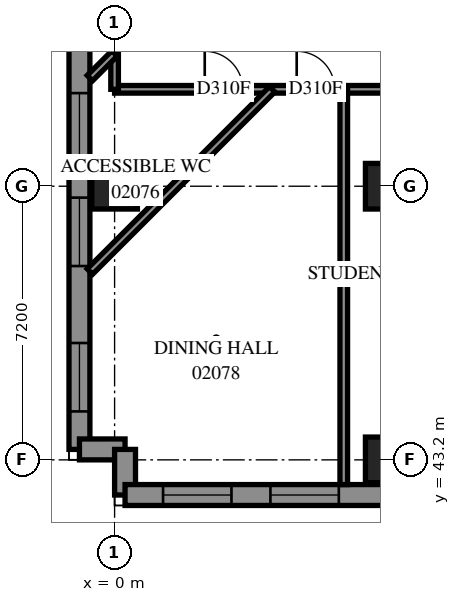
"""IFC4 building model, lengths in metres.
Left out: names, types, materials, properties, quantities, classifications, styles, units other than length and angle.
Written with IfcOpenShell. Run it as: python <this file> out.ifc"""

import sys

from ifc_helpers import new_model, si_unit, direction, frame, frame_2d, origin, origin_2d, place, context, subcontext, project, spatial, polyline, rectangle, outline, extrude, element, fill, save


model = new_model("IFC4")
c1 = context("Model", 3, precision=1e-05, world=origin(), true_north=direction((0.0, 1.0)))
c2 = subcontext(c1, "Body", "Model", "MODEL_VIEW")
j1 = project(units=[si_unit("LENGTHUNIT", "METRE"), si_unit("PLANEANGLEUNIT", "RADIAN")], contexts=[c1])
p1 = place(None, origin())
s1 = spatial("IfcSite", under=j1, at=p1, CompositionType="ELEMENT")
p2 = place(p1, origin())
s2 = spatial("IfcBuilding", under=s1, at=p2, CompositionType="ELEMENT")
p3 = place(p2, frame((0.0, 0.0, 10.2)))
s3 = spatial("IfcBuildingStorey", under=s2, at=p3, CompositionType="ELEMENT", Elevation=10.2)
for number, where, z_axis, x_axis in (
    (1, (0.0, 50.4, 0.0), (0.0, 0.0, 1.0), (1.0, 0.0, 0.0)),
    (2, (7.2, 43.2, 0.0), (0.0, 0.0, 1.0), (1.0, 0.0, 0.0)),
    (3, (7.2, 50.4, 0.0), (0.0, 0.0, 1.0), (1.0, 0.0, 0.0)),
):
    element("IfcColumn", number, at=place(p3, frame(where, z_axis=z_axis, x_axis=x_axis)), inside=s3, PredefinedType="COLUMN", context=c2, shape_type="SweptSolid", body=[
        extrude(rectangle(XDim=1.2, YDim=1.2, at=origin_2d()), origin(), (0.0, 0.0, 1.0), 3.8),
    ])
p4 = place(p3, frame((-0.925, 71.725, 0.0), z_axis=(0.0, 0.0, 1.0), x_axis=(0.0, -1.0, 0.0)))
e4 = element("IfcWall", 4, at=p4, inside=s3, PredefinedType="SOLIDWALL", context=c2, shape_type="SweptSolid", body=[
    extrude(outline(polyline([(-0.275, -0.275), (28.525, -0.275), (27.975, 0.275), (0.275, 0.275), (-0.275, -0.275)])), origin(), (0.0, 0.0, 1.0), 3.8),
])
p5 = place(p4, frame((1.0, 0.0, 0.7)))
e5 = element("IfcOpeningElement", 5, at=p5, cuts=e4, PredefinedType="OPENING", context=c2, shape_type="SweptSolid", body=[
    extrude(rectangle(XDim=1.8, YDim=2.6, at=frame_2d((0.9, 1.3))), frame((0.0, 0.285, 0.0), z_axis=(0.0, -1.0, 0.0), x_axis=(1.0, 0.0, 0.0)), (0.0, 0.0, 1.0), 0.57),
])
p6 = place(p4, frame((4.225, 0.0, 0.7)))
e6 = element("IfcOpeningElement", 6, at=p6, cuts=e4, PredefinedType="OPENING", context=c2, shape_type="SweptSolid", body=[
    extrude(rectangle(XDim=1.8, YDim=2.6, at=frame_2d((0.9, 1.3))), frame((0.0, 0.285, 0.0), z_axis=(0.0, -1.0, 0.0), x_axis=(1.0, 0.0, 0.0)), (0.0, 0.0, 1.0), 0.57),
])
p7 = place(p4, frame((7.525, 0.0, 0.7)))
e7 = element("IfcOpeningElement", 7, at=p7, cuts=e4, PredefinedType="OPENING", context=c2, shape_type="SweptSolid", body=[
    extrude(rectangle(XDim=1.8, YDim=2.6, at=frame_2d((0.9, 1.3))), frame((0.0, 0.285, 0.0), z_axis=(0.0, -1.0, 0.0), x_axis=(1.0, 0.0, 0.0)), (0.0, 0.0, 1.0), 0.57),
])
p8 = place(p4, frame((14.725, 0.0, 0.7)))
e8 = element("IfcOpeningElement", 8, at=p8, cuts=e4, PredefinedType="OPENING", context=c2, shape_type="SweptSolid", body=[
    extrude(rectangle(XDim=1.8, YDim=2.6, at=frame_2d((0.9, 1.3))), frame((0.0, 0.285, 0.0), z_axis=(0.0, -1.0, 0.0), x_axis=(1.0, 0.0, 0.0)), (0.0, 0.0, 1.0), 0.57),
])
p9 = place(p4, frame((18.875, 0.0, 0.7)))
e9 = element("IfcOpeningElement", 9, at=p9, cuts=e4, PredefinedType="OPENING", context=c2, shape_type="SweptSolid", body=[
    extrude(rectangle(XDim=1.8, YDim=2.6, at=frame_2d((0.9, 1.3))), frame((0.0, 0.285, 0.0), z_axis=(0.0, -1.0, 0.0), x_axis=(1.0, 0.0, 0.0)), (0.0, 0.0, 1.0), 0.57),
])
p10 = place(p4, frame((21.625, 0.0, 0.7)))
e10 = element("IfcOpeningElement", 10, at=p10, cuts=e4, PredefinedType="OPENING", context=c2, shape_type="SweptSolid", body=[
    extrude(rectangle(XDim=1.8, YDim=2.6, at=frame_2d((0.9, 1.3))), frame((0.0, 0.285, 0.0), z_axis=(0.0, -1.0, 0.0), x_axis=(1.0, 0.0, 0.0)), (0.0, 0.0, 1.0), 0.57),
])
p11 = place(p4, frame((25.45, 0.0, 0.7)))
e11 = element("IfcOpeningElement", 11, at=p11, cuts=e4, PredefinedType="OPENING", context=c2, shape_type="SweptSolid", body=[
    extrude(rectangle(XDim=1.8, YDim=2.6, at=frame_2d((0.9, 1.3))), frame((0.0, 0.285, 0.0), z_axis=(0.0, -1.0, 0.0), x_axis=(1.0, 0.0, 0.0)), (0.0, 0.0, 1.0), 0.57),
])
p12 = place(p4, frame((11.8, 0.0, 0.45)))
e12 = element("IfcOpeningElement", 12, at=p12, cuts=e4, PredefinedType="OPENING", context=c2, shape_type="SweptSolid", body=[
    extrude(rectangle(XDim=1.3, YDim=2.5, at=frame_2d((0.65, 1.25))), frame((0.0, 0.285, 0.0), z_axis=(0.0, -1.0, 0.0), x_axis=(1.0, 0.0, 0.0)), (0.0, 0.0, 1.0), 0.57),
])
p13 = place(p3, frame((-0.925, 43.475, 0.0), z_axis=(0.0, 0.0, 1.0), x_axis=(1.0, 0.0, 0.0)))
e13 = element("IfcWall", 13, at=p13, inside=s3, PredefinedType="SOLIDWALL", context=c2, shape_type="SweptSolid", body=[
    extrude(outline(polyline([(-0.275, -0.275), (0.925, -0.275), (1.475, 0.275), (0.275, 0.275), (-0.275, -0.275)])), origin(), (0.0, 0.0, 1.0), 3.8),
])
p14 = place(p3, frame((0.275, 43.475, 0.0), z_axis=(0.0, 0.0, 1.0), x_axis=(0.0, -1.0, 0.0)))
e14 = element("IfcWall", 14, at=p14, inside=s3, PredefinedType="SOLIDWALL", context=c2, shape_type="SweptSolid", body=[
    extrude(outline(polyline([(0.275, -0.275), (1.475, -0.275), (0.925, 0.275), (-0.275, 0.275), (0.275, -0.275)])), origin(), (0.0, 0.0, 1.0), 3.8),
])
p15 = place(p3, frame((0.275, 42.275, 0.0), z_axis=(0.0, 0.0, 1.0), x_axis=(1.0, 0.0, 0.0)))
e15 = element("IfcWall", 15, at=p15, inside=s3, PredefinedType="SOLIDWALL", context=c2, shape_type="SweptSolid", body=[
    extrude(outline(polyline([(-0.275, -0.275), (12.925, -0.275), (13.475, 0.275), (0.275, 0.275), (-0.275, -0.275)])), origin(), (0.0, 0.0, 1.0), 3.8),
])
p16 = place(p15, frame((1.0, 0.0, 0.7)))
e16 = element("IfcOpeningElement", 16, at=p16, cuts=e15, PredefinedType="OPENING", context=c2, shape_type="SweptSolid", body=[
    extrude(rectangle(XDim=1.8, YDim=2.6, at=frame_2d((0.9, 1.3))), frame((0.0, 0.285, 0.0), z_axis=(0.0, -1.0, 0.0), x_axis=(1.0, 0.0, 0.0)), (0.0, 0.0, 1.0), 0.57),
])
p17 = place(p15, frame((3.825, 0.0, 0.7)))
e17 = element("IfcOpeningElement", 17, at=p17, cuts=e15, PredefinedType="OPENING", context=c2, shape_type="SweptSolid", body=[
    extrude(rectangle(XDim=1.8, YDim=2.6, at=frame_2d((0.9, 1.3))), frame((0.0, 0.285, 0.0), z_axis=(0.0, -1.0, 0.0), x_axis=(1.0, 0.0, 0.0)), (0.0, 0.0, 1.0), 0.57),
])
p18 = place(p15, frame((7.825, 0.0, 0.7)))
e18 = element("IfcOpeningElement", 18, at=p18, cuts=e15, PredefinedType="OPENING", context=c2, shape_type="SweptSolid", body=[
    extrude(rectangle(XDim=1.8, YDim=2.6, at=frame_2d((0.9, 1.3))), frame((0.0, 0.285, 0.0), z_axis=(0.0, -1.0, 0.0), x_axis=(1.0, 0.0, 0.0)), (0.0, 0.0, 1.0), 0.57),
])
p19 = place(p15, frame((10.863, 0.0, 0.7)))
e19 = element("IfcOpeningElement", 19, at=p19, cuts=e15, PredefinedType="OPENING", context=c2, shape_type="SweptSolid", body=[
    extrude(rectangle(XDim=1.8, YDim=2.6, at=frame_2d((0.9, 1.3))), frame((0.0, 0.285, 0.0), z_axis=(0.0, -1.0, 0.0), x_axis=(1.0, 0.0, 0.0)), (0.0, 0.0, 1.0), 0.57),
])
p20 = place(p3, frame((0.0, 52.95, 0.0), z_axis=(0.0, 0.0, 1.0), x_axis=(1.0, 0.0, 0.0)))
e20 = element("IfcWall", 20, at=p20, inside=s3, PredefinedType="PARTITIONING", context=c2, shape_type="SweptSolid", body=[
    extrude(rectangle(XDim=54.5, YDim=0.2, at=frame_2d((27.25, 0.0))), origin(), (0.0, 0.0, 1.0), 3.8),
])
p21 = place(p20, frame((8.669, 0.0, 0.0)))
e21 = element("IfcOpeningElement", 21, at=p21, cuts=e20, PredefinedType="OPENING", context=c2, shape_type="SweptSolid", body=[
    extrude(rectangle(XDim=1.0, YDim=2.1, at=frame_2d((0.5, 1.05))), frame((0.0, 0.11, 0.0), z_axis=(0.0, -1.0, 0.0), x_axis=(1.0, 0.0, 0.0)), (0.0, 0.0, 1.0), 0.22),
])
p22 = place(p20, frame((11.307, 0.0, 0.0)))
e22 = element("IfcOpeningElement", 22, at=p22, cuts=e20, PredefinedType="OPENING", context=c2, shape_type="SweptSolid", body=[
    extrude(rectangle(XDim=1.0, YDim=2.1, at=frame_2d((0.5, 1.05))), frame((0.0, 0.11, 0.0), z_axis=(0.0, -1.0, 0.0), x_axis=(1.0, 0.0, 0.0)), (0.0, 0.0, 1.0), 0.22),
])
p23 = place(p20, frame((16.433, 0.0, 0.0)))
e23 = element("IfcOpeningElement", 23, at=p23, cuts=e20, PredefinedType="OPENING", context=c2, shape_type="SweptSolid", body=[
    extrude(rectangle(XDim=1.0, YDim=2.1, at=frame_2d((0.5, 1.05))), frame((0.0, 0.11, 0.0), z_axis=(0.0, -1.0, 0.0), x_axis=(1.0, 0.0, 0.0)), (0.0, 0.0, 1.0), 0.22),
])
p24 = place(p20, frame((22.025, 0.0, 0.0)))
e24 = element("IfcOpeningElement", 24, at=p24, cuts=e20, PredefinedType="OPENING", context=c2, shape_type="SweptSolid", body=[
    extrude(rectangle(XDim=1.0, YDim=2.1, at=frame_2d((0.5, 1.05))), frame((0.0, 0.11, 0.0), z_axis=(0.0, -1.0, 0.0), x_axis=(1.0, 0.0, 0.0)), (0.0, 0.0, 1.0), 0.22),
])
p25 = place(p20, frame((30.565, 0.0, 0.0)))
e25 = element("IfcOpeningElement", 25, at=p25, cuts=e20, PredefinedType="OPENING", context=c2, shape_type="SweptSolid", body=[
    extrude(rectangle(XDim=1.0, YDim=2.1, at=frame_2d((0.5, 1.05))), frame((0.0, 0.11, 0.0), z_axis=(0.0, -1.0, 0.0), x_axis=(1.0, 0.0, 0.0)), (0.0, 0.0, 1.0), 0.22),
])
p26 = place(p20, frame((32.925, 0.0, 0.0)))
e26 = element("IfcOpeningElement", 26, at=p26, cuts=e20, PredefinedType="OPENING", context=c2, shape_type="SweptSolid", body=[
    extrude(rectangle(XDim=1.0, YDim=2.1, at=frame_2d((0.5, 1.05))), frame((0.0, 0.11, 0.0), z_axis=(0.0, -1.0, 0.0), x_axis=(1.0, 0.0, 0.0)), (0.0, 0.0, 1.0), 0.22),
])
p27 = place(p20, frame((37.765, 0.0, 0.0)))
e27 = element("IfcOpeningElement", 27, at=p27, cuts=e20, PredefinedType="OPENING", context=c2, shape_type="SweptSolid", body=[
    extrude(rectangle(XDim=1.0, YDim=2.1, at=frame_2d((0.5, 1.05))), frame((0.0, 0.11, 0.0), z_axis=(0.0, -1.0, 0.0), x_axis=(1.0, 0.0, 0.0)), (0.0, 0.0, 1.0), 0.22),
])
p28 = place(p20, frame((40.125, 0.0, 0.0)))
e28 = element("IfcOpeningElement", 28, at=p28, cuts=e20, PredefinedType="OPENING", context=c2, shape_type="SweptSolid", body=[
    extrude(rectangle(XDim=1.0, YDim=2.1, at=frame_2d((0.5, 1.05))), frame((0.0, 0.11, 0.0), z_axis=(0.0, -1.0, 0.0), x_axis=(1.0, 0.0, 0.0)), (0.0, 0.0, 1.0), 0.22),
])
p29 = place(p20, frame((44.965, 0.0, 0.0)))
e29 = element("IfcOpeningElement", 29, at=p29, cuts=e20, PredefinedType="OPENING", context=c2, shape_type="SweptSolid", body=[
    extrude(rectangle(XDim=1.0, YDim=2.1, at=frame_2d((0.5, 1.05))), frame((0.0, 0.11, 0.0), z_axis=(0.0, -1.0, 0.0), x_axis=(1.0, 0.0, 0.0)), (0.0, 0.0, 1.0), 0.22),
])
p30 = place(p20, frame((47.325, 0.0, 0.0)))
e30 = element("IfcOpeningElement", 30, at=p30, cuts=e20, PredefinedType="OPENING", context=c2, shape_type="SweptSolid", body=[
    extrude(rectangle(XDim=1.0, YDim=2.1, at=frame_2d((0.5, 1.05))), frame((0.0, 0.11, 0.0), z_axis=(0.0, -1.0, 0.0), x_axis=(1.0, 0.0, 0.0)), (0.0, 0.0, 1.0), 0.22),
])
p31 = place(p20, frame((52.165, 0.0, 0.0)))
e31 = element("IfcOpeningElement", 31, at=p31, cuts=e20, PredefinedType="OPENING", context=c2, shape_type="SweptSolid", body=[
    extrude(rectangle(XDim=1.0, YDim=2.1, at=frame_2d((0.5, 1.05))), frame((0.0, 0.11, 0.0), z_axis=(0.0, -1.0, 0.0), x_axis=(1.0, 0.0, 0.0)), (0.0, 0.0, 1.0), 0.22),
])
p32 = place(p20, frame((2.372, 0.0, 0.0)))
e32 = element("IfcOpeningElement", 32, at=p32, cuts=e20, PredefinedType="OPENING", context=c2, shape_type="SweptSolid", body=[
    extrude(rectangle(XDim=1.0, YDim=2.1, at=frame_2d((0.5, 1.05))), frame((0.0, 0.11, 0.0), z_axis=(0.0, -1.0, 0.0), x_axis=(1.0, 0.0, 0.0)), (0.0, 0.0, 1.0), 0.22),
])
p33 = place(p20, frame((4.792, 0.0, 0.0)))
e33 = element("IfcOpeningElement", 33, at=p33, cuts=e20, PredefinedType="OPENING", context=c2, shape_type="SweptSolid", body=[
    extrude(rectangle(XDim=1.0, YDim=2.1, at=frame_2d((0.5, 1.05))), frame((0.0, 0.11, 0.0), z_axis=(0.0, -1.0, 0.0), x_axis=(1.0, 0.0, 0.0)), (0.0, 0.0, 1.0), 0.22),
])
p34 = place(p3, frame((6.03, 42.55, 0.0), z_axis=(0.0, 0.0, 1.0), x_axis=(0.0, 1.0, 0.0)))
e34 = element("IfcWall", 34, at=p34, inside=s3, PredefinedType="PARTITIONING", context=c2, shape_type="SweptSolid", body=[
    extrude(rectangle(XDim=10.4, YDim=0.2, at=frame_2d((5.2, 0.0))), origin(), (0.0, 0.0, 1.0), 3.8),
])
p35 = place(p3, frame((-0.65, 48.154, 0.0), z_axis=(0.0, 0.0, 1.0), x_axis=(0.7070994105, 0.7071141518, 0.0)))
e35 = element("IfcWall", 35, at=p35, inside=s3, PredefinedType="PARTITIONING", context=c2, shape_type="SweptSolid", body=[
    extrude(rectangle(XDim=6.784, YDim=0.2, at=frame_2d((3.392, 0.0))), origin(), (0.0, 0.0, 1.0), 3.8),
])
p36 = place(p3, frame((0.0, 52.95, 0.0), z_axis=(0.0, 0.0, 1.0), x_axis=(0.0, 1.0, 0.0)))
e36 = element("IfcWall", 36, at=p36, inside=s3, PredefinedType="PARTITIONING", context=c2, shape_type="SweptSolid", body=[
    extrude(rectangle(XDim=2.1, YDim=0.2, at=frame_2d((1.05, 0.0))), origin(), (0.0, 0.0, 1.0), 3.2),
])
p37 = place(p3, frame((-0.65, 53.246, 0.0), z_axis=(0.0, 0.0, 1.0), x_axis=(0.7071612431, 0.707052315, 0.0)))
e37 = element("IfcWall", 37, at=p37, inside=s3, PredefinedType="PARTITIONING", context=c2, shape_type="SweptSolid", body=[
    extrude(rectangle(XDim=0.918, YDim=0.2, at=frame_2d((0.459, 0.0))), origin(), (0.0, 0.0, 1.0), 3.8),
])
p38 = place(p9, origin())
e38 = element("IfcWindow", 38, at=p38, inside=s3, PartitioningType="SINGLE_PANEL", PredefinedType="WINDOW", context=c2, shape_type="SweptSolid", body=[
    extrude(rectangle(XDim=1.8, YDim=2.6, at=frame_2d((0.9, 1.3))), frame((0.0, 0.155, 0.0), z_axis=(0.0, -1.0, 0.0), x_axis=(1.0, 0.0, 0.0)), (0.0, 0.0, 1.0), 0.06),
])
fill(e9, e38)
p39 = place(p10, origin())
e39 = element("IfcWindow", 39, at=p39, inside=s3, PartitioningType="SINGLE_PANEL", PredefinedType="WINDOW", context=c2, shape_type="SweptSolid", body=[
    extrude(rectangle(XDim=1.8, YDim=2.6, at=frame_2d((0.9, 1.3))), frame((0.0, 0.155, 0.0), z_axis=(0.0, -1.0, 0.0), x_axis=(1.0, 0.0, 0.0)), (0.0, 0.0, 1.0), 0.06),
])
fill(e10, e39)
p40 = place(p11, origin())
e40 = element("IfcWindow", 40, at=p40, inside=s3, PartitioningType="SINGLE_PANEL", PredefinedType="WINDOW", context=c2, shape_type="SweptSolid", body=[
    extrude(rectangle(XDim=1.8, YDim=2.6, at=frame_2d((0.9, 1.3))), frame((0.0, 0.155, 0.0), z_axis=(0.0, -1.0, 0.0), x_axis=(1.0, 0.0, 0.0)), (0.0, 0.0, 1.0), 0.06),
])
fill(e11, e40)
p41 = place(p16, origin())
e41 = element("IfcWindow", 41, at=p41, inside=s3, PartitioningType="SINGLE_PANEL", PredefinedType="WINDOW", context=c2, shape_type="SweptSolid", body=[
    extrude(rectangle(XDim=1.8, YDim=2.6, at=frame_2d((0.9, 1.3))), frame((0.0, 0.155, 0.0), z_axis=(0.0, -1.0, 0.0), x_axis=(1.0, 0.0, 0.0)), (0.0, 0.0, 1.0), 0.06),
])
fill(e16, e41)
p42 = place(p17, origin())
e42 = element("IfcWindow", 42, at=p42, inside=s3, PartitioningType="SINGLE_PANEL", PredefinedType="WINDOW", context=c2, shape_type="SweptSolid", body=[
    extrude(rectangle(XDim=1.8, YDim=2.6, at=frame_2d((0.9, 1.3))), frame((0.0, 0.155, 0.0), z_axis=(0.0, -1.0, 0.0), x_axis=(1.0, 0.0, 0.0)), (0.0, 0.0, 1.0), 0.06),
])
fill(e17, e42)
p43 = place(p32, origin())
e43 = element("IfcDoor", 43, at=p43, inside=s3, OperationType="SINGLE_SWING_RIGHT", PredefinedType="DOOR", context=c2, shape_type="SweptSolid", body=[
    extrude(rectangle(XDim=1.0, YDim=2.1, at=frame_2d((0.5, 1.05))), frame((0.0, 0.025, 0.0), z_axis=(0.0, -1.0, 0.0), x_axis=(1.0, 0.0, 0.0)), (0.0, 0.0, 1.0), 0.05),
])
fill(e32, e43)
p44 = place(p33, origin())
e44 = element("IfcDoor", 44, at=p44, inside=s3, OperationType="SINGLE_SWING_LEFT", PredefinedType="DOOR", context=c2, shape_type="SweptSolid", body=[
    extrude(rectangle(XDim=1.0, YDim=2.1, at=frame_2d((0.5, 1.05))), frame((0.0, 0.025, 0.0), z_axis=(0.0, -1.0, 0.0), x_axis=(1.0, 0.0, 0.0)), (0.0, 0.0, 1.0), 0.05),
])
fill(e33, e44)
save(model, sys.argv[1])
